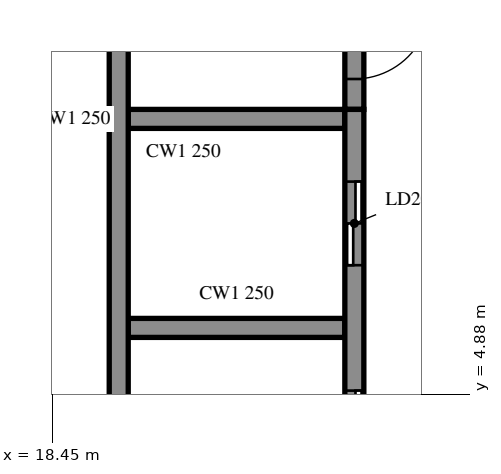
"""IFC4 building model, lengths in metres.
Left out: names, types, materials, properties, quantities, classifications, styles, units other than length and angle.
Written with IfcOpenShell. Run it as: python <this file> out.ifc"""

import sys

from ifc_helpers import new_model, si_unit, direction, frame, frame_2d, origin, place, context, subcontext, project, spatial, rectangle, extrude, element, fill, save


model = new_model("IFC4")
c1 = context("Model", 3, precision=1e-05, world=origin(), true_north=direction((0.0, 1.0)))
c2 = subcontext(c1, "Body", "Model", "MODEL_VIEW")
j1 = project(units=[si_unit("LENGTHUNIT", "METRE"), si_unit("PLANEANGLEUNIT", "RADIAN")], contexts=[c1])
p1 = place(None, origin())
s1 = spatial("IfcSite", under=j1, at=p1, CompositionType="ELEMENT")
p2 = place(p1, origin())
s2 = spatial("IfcBuilding", under=s1, at=p2, CompositionType="ELEMENT")
p3 = place(p2, frame((0.0, 0.0, 80.4)))
s3 = spatial("IfcBuildingStorey", under=s2, at=p3, CompositionType="ELEMENT", Elevation=80.4)
p4 = place(p3, frame((19.325, 15.125, 0.0), z_axis=(0.0, 0.0, 1.0), x_axis=(0.0, -1.0, 0.0)))
e1 = element("IfcWall", 1, at=p4, inside=s3, PredefinedType="SOLIDWALL", context=c2, shape_type="SweptSolid", body=[
    extrude(rectangle(XDim=24.25, YDim=0.25, at=frame_2d((12.125, 0.0))), origin(), (0.0, 0.0, 1.0), 4.06),
])
p5 = place(p3, frame((22.425, -8.875, 0.0), z_axis=(0.0, 0.0, 1.0), x_axis=(0.0, 1.0, 0.0)))
e2 = element("IfcWall", 2, at=p5, inside=s3, PredefinedType="SOLIDWALL", context=c2, shape_type="SweptSolid", body=[
    extrude(rectangle(XDim=17.5, YDim=0.25, at=frame_2d((8.75, 0.0))), origin(), (0.0, 0.0, 1.0), 4.06),
])
p6 = place(p5, frame((7.2, 0.0, 0.0)))
e3 = element("IfcOpeningElement", 3, at=p6, cuts=e2, PredefinedType="OPENING", context=c2, shape_type="SweptSolid", body=[
    extrude(rectangle(XDim=1.1, YDim=2.1, at=frame_2d((0.55, 1.05))), frame((0.0, 0.135, 0.0), z_axis=(0.0, -1.0, 0.0), x_axis=(1.0, 0.0, 0.0)), (0.0, 0.0, 1.0), 0.27),
])
p7 = place(p5, frame((9.95, 0.0, 0.0)))
e4 = element("IfcOpeningElement", 4, at=p7, cuts=e2, PredefinedType="OPENING", context=c2, shape_type="SweptSolid", body=[
    extrude(rectangle(XDim=1.1, YDim=2.1, at=frame_2d((0.55, 1.05))), frame((0.0, 0.135, 0.0), z_axis=(0.0, -1.0, 0.0), x_axis=(1.0, 0.0, 0.0)), (0.0, 0.0, 1.0), 0.27),
])
p8 = place(p5, frame((12.7, 0.0, 0.0)))
e5 = element("IfcOpeningElement", 5, at=p8, cuts=e2, PredefinedType="OPENING", context=c2, shape_type="SweptSolid", body=[
    extrude(rectangle(XDim=1.1, YDim=2.1, at=frame_2d((0.55, 1.05))), frame((0.0, 0.135, 0.0), z_axis=(0.0, -1.0, 0.0), x_axis=(1.0, 0.0, 0.0)), (0.0, 0.0, 1.0), 0.27),
])
p9 = place(p5, frame((15.45, 0.0, 0.0)))
e6 = element("IfcOpeningElement", 6, at=p9, cuts=e2, PredefinedType="OPENING", context=c2, shape_type="SweptSolid", body=[
    extrude(rectangle(XDim=1.1, YDim=2.1, at=frame_2d((0.55, 1.05))), frame((0.0, 0.135, 0.0), z_axis=(0.0, -1.0, 0.0), x_axis=(1.0, 0.0, 0.0)), (0.0, 0.0, 1.0), 0.27),
])
p10 = place(p5, frame((0.712, 0.0, 0.0)))
e7 = element("IfcOpeningElement", 7, at=p10, cuts=e2, PredefinedType="OPENING", context=c2, shape_type="SweptSolid", body=[
    extrude(rectangle(XDim=0.9, YDim=2.1, at=frame_2d((0.45, 1.05))), frame((0.0, 0.135, 0.0), z_axis=(0.0, -1.0, 0.0), x_axis=(1.0, 0.0, 0.0)), (0.0, 0.0, 1.0), 0.27),
])
p11 = place(p5, frame((3.788, 0.0, 0.0)))
e8 = element("IfcOpeningElement", 8, at=p11, cuts=e2, PredefinedType="OPENING", context=c2, shape_type="SweptSolid", body=[
    extrude(rectangle(XDim=0.9, YDim=2.1, at=frame_2d((0.45, 1.05))), frame((0.0, 0.135, 0.0), z_axis=(0.0, -1.0, 0.0), x_axis=(1.0, 0.0, 0.0)), (0.0, 0.0, 1.0), 0.27),
])
p12 = place(p3, frame((22.425, 14.875, 0.0), z_axis=(0.0, 0.0, 1.0), x_axis=(0.0, -1.0, 0.0)))
e9 = element("IfcWall", 9, at=p12, inside=s3, PredefinedType="SOLIDWALL", context=c2, shape_type="SweptSolid", body=[
    extrude(rectangle(XDim=6.25, YDim=0.25, at=frame_2d((3.125, 0.0))), origin(), (0.0, 0.0, 1.0), 4.06),
])
p13 = place(p12, frame((4.85, 0.0, 0.0)))
e10 = element("IfcOpeningElement", 10, at=p13, cuts=e9, PredefinedType="OPENING", context=c2, shape_type="SweptSolid", body=[
    extrude(rectangle(XDim=1.0, YDim=2.1, at=frame_2d((0.5, 1.05))), frame((0.0, 0.135, 0.0), z_axis=(0.0, -1.0, 0.0), x_axis=(1.0, 0.0, 0.0)), (0.0, 0.0, 1.0), 0.27),
])
for number, where, z_axis, x_axis in (
    (11, (19.45, 5.75, 0.0), (0.0, 0.0, 1.0), (1.0, 0.0, 0.0)),
    (12, (19.45, 8.5, 0.0), (0.0, 0.0, 1.0), (1.0, 0.0, 0.0)),
):
    element("IfcWall", number, at=place(p3, frame(where, z_axis=z_axis, x_axis=x_axis)), inside=s3, PredefinedType="SOLIDWALL", context=c2, shape_type="SweptSolid", body=[
        extrude(rectangle(XDim=2.85, YDim=0.25, at=frame_2d((1.425, 0.0))), origin(), (0.0, 0.0, 1.0), 4.06),
    ])
p14 = place(p8, origin())
e13 = element("IfcDoor", 13, at=p14, inside=s3, OperationType="DOUBLE_DOOR_SLIDING", PredefinedType="DOOR", context=c2, shape_type="SweptSolid", body=[
    extrude(rectangle(XDim=1.1, YDim=2.1, at=frame_2d((0.55, 1.05))), frame((0.0, 0.025, 0.0), z_axis=(0.0, -1.0, 0.0), x_axis=(1.0, 0.0, 0.0)), (0.0, 0.0, 1.0), 0.05),
])
fill(e5, e13)
p15 = place(p9, origin())
e14 = element("IfcDoor", 14, at=p15, inside=s3, OperationType="DOUBLE_DOOR_SLIDING", PredefinedType="DOOR", context=c2, shape_type="SweptSolid", body=[
    extrude(rectangle(XDim=1.1, YDim=2.1, at=frame_2d((0.55, 1.05))), frame((0.0, 0.025, 0.0), z_axis=(0.0, -1.0, 0.0), x_axis=(1.0, 0.0, 0.0)), (0.0, 0.0, 1.0), 0.05),
])
fill(e6, e14)
p16 = place(p13, origin())
e15 = element("IfcDoor", 15, at=p16, inside=s3, OperationType="SINGLE_SWING_LEFT", PredefinedType="DOOR", context=c2, shape_type="SweptSolid", body=[
    extrude(rectangle(XDim=1.0, YDim=2.1, at=frame_2d((0.5, 1.05))), frame((0.0, 0.025, 0.0), z_axis=(0.0, -1.0, 0.0), x_axis=(1.0, 0.0, 0.0)), (0.0, 0.0, 1.0), 0.05),
])
fill(e10, e15)
save(model, sys.argv[1])
